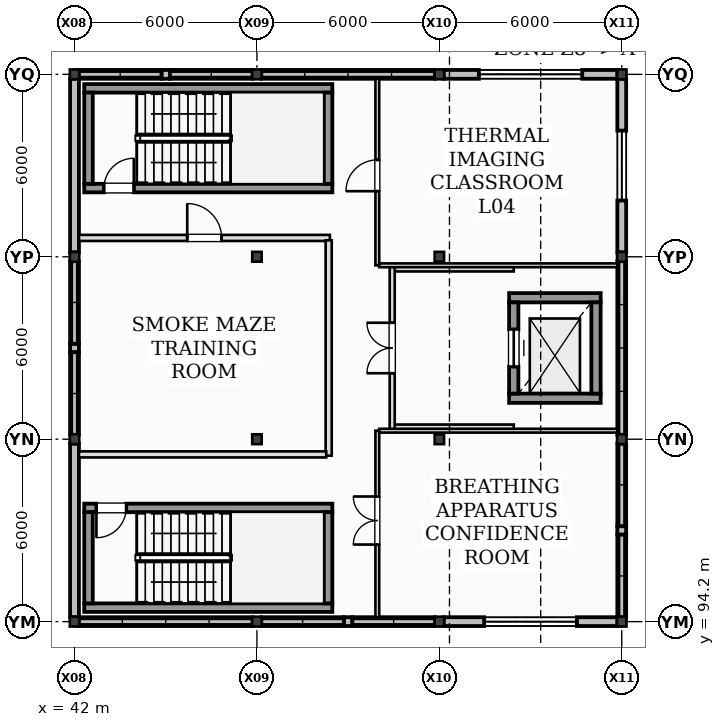
"""IFC4 building model, lengths in metres.
Left out: names, types, materials, properties, quantities, classifications, styles, units other than length and angle.
Written with IfcOpenShell. Run it as: python <this file> out.ifc"""

import sys

from ifc_helpers import new_model, si_unit, direction, frame, frame_2d, origin, origin_2d, place, context, subcontext, project, spatial, rectangle, i_section, extrude, element, fill, save


model = new_model("IFC4")
c1 = context("Model", 3, precision=1e-05, world=origin(), true_north=direction((0.0, 1.0)))
c2 = subcontext(c1, "Body", "Model", "MODEL_VIEW")
j1 = project(units=[si_unit("LENGTHUNIT", "METRE"), si_unit("PLANEANGLEUNIT", "RADIAN")], contexts=[c1])
p1 = place(None, origin())
s1 = spatial("IfcSite", under=j1, at=p1, CompositionType="ELEMENT")
p2 = place(p1, origin())
s2 = spatial("IfcBuilding", under=s1, at=p2, CompositionType="ELEMENT")
p3 = place(p2, frame((0.0, 0.0, 14.0)))
s3 = spatial("IfcBuildingStorey", under=s2, at=p3, CompositionType="ELEMENT", Elevation=14.0)
for number, where, z_axis, x_axis in (
    (1, (42.0, 94.2, 0.0), (0.0, 0.0, 1.0), (1.0, 0.0, 0.0)),
    (2, (42.0, 100.2, 0.0), (0.0, 0.0, 1.0), (1.0, 0.0, 0.0)),
    (3, (42.0, 106.2, 0.0), (0.0, 0.0, 1.0), (1.0, 0.0, 0.0)),
    (4, (42.0, 112.2, 0.0), (0.0, 0.0, 1.0), (1.0, 0.0, 0.0)),
    (5, (48.0, 94.2, 0.0), (0.0, 0.0, 1.0), (1.0, 0.0, 0.0)),
    (6, (48.0, 100.2, 0.0), (0.0, 0.0, 1.0), (1.0, 0.0, 0.0)),
    (7, (48.0, 106.2, 0.0), (0.0, 0.0, 1.0), (1.0, 0.0, 0.0)),
    (8, (48.0, 112.2, 0.0), (0.0, 0.0, 1.0), (1.0, 0.0, 0.0)),
    (9, (54.0, 94.2, 0.0), (0.0, 0.0, 1.0), (1.0, 0.0, 0.0)),
    (10, (54.0, 100.2, 0.0), (0.0, 0.0, 1.0), (1.0, 0.0, 0.0)),
    (11, (54.0, 106.2, 0.0), (0.0, 0.0, 1.0), (1.0, 0.0, 0.0)),
    (12, (54.0, 112.2, 0.0), (0.0, 0.0, 1.0), (1.0, 0.0, 0.0)),
    (13, (60.0, 94.2, 0.0), (0.0, 0.0, 1.0), (1.0, 0.0, 0.0)),
    (14, (60.0, 100.2, 0.0), (0.0, 0.0, 1.0), (1.0, 0.0, 0.0)),
    (15, (60.0, 106.2, 0.0), (0.0, 0.0, 1.0), (1.0, 0.0, 0.0)),
    (16, (60.0, 112.2, 0.0), (0.0, 0.0, 1.0), (1.0, 0.0, 0.0)),
):
    element("IfcColumn", number, at=place(p3, frame(where, z_axis=z_axis, x_axis=x_axis)), inside=s3, PredefinedType="COLUMN", context=c2, shape_type="SweptSolid", body=[
        extrude(i_section(OverallWidth=0.309, OverallDepth=0.323, WebThickness=0.013, FlangeThickness=0.023, at=origin_2d()), origin(), (0.0, 0.0, 1.0), 4.0),
    ])
p4 = place(p3, frame((42.145, 94.2, 0.0), z_axis=(0.0, 0.0, 1.0), x_axis=(1.0, 0.0, 0.0)))
e17 = element("IfcWall", 17, at=p4, inside=s3, PredefinedType="STANDARD", context=c2, shape_type="SweptSolid", body=[
    extrude(rectangle(XDim=5.71, YDim=0.29, at=frame_2d((2.855, 0.0))), origin(), (0.0, 0.0, 1.0), 0.56),
])
p5 = place(p3, frame((50.86, 94.2, 0.0), z_axis=(0.0, 0.0, 1.0), x_axis=(1.0, 0.0, 0.0)))
e18 = element("IfcWall", 18, at=p5, inside=s3, PredefinedType="STANDARD", context=c2, shape_type="SweptSolid", body=[
    extrude(rectangle(XDim=0.28, YDim=0.29, at=frame_2d((0.14, 0.0))), origin(), (0.0, 0.0, 1.0), 3.269),
])
p6 = place(p3, frame((48.145, 94.2, 0.0), z_axis=(0.0, 0.0, 1.0), x_axis=(1.0, 0.0, 0.0)))
e19 = element("IfcWall", 19, at=p6, inside=s3, PredefinedType="STANDARD", context=c2, shape_type="SweptSolid", body=[
    extrude(rectangle(XDim=2.715, YDim=0.29, at=frame_2d((1.357, 0.0))), origin(), (0.0, 0.0, 1.0), 0.68),
])
p7 = place(p3, frame((51.14, 94.2, 0.0), z_axis=(0.0, 0.0, 1.0), x_axis=(1.0, 0.0, 0.0)))
e20 = element("IfcWall", 20, at=p7, inside=s3, PredefinedType="STANDARD", context=c2, shape_type="SweptSolid", body=[
    extrude(rectangle(XDim=2.715, YDim=0.29, at=frame_2d((1.357, 0.0))), origin(), (0.0, 0.0, 1.0), 0.8),
])
p8 = place(p3, frame((54.145, 94.2, 0.0), z_axis=(0.0, 0.0, 1.0), x_axis=(1.0, 0.0, 0.0)))
e21 = element("IfcWall", 21, at=p8, inside=s3, PredefinedType="STANDARD", context=c2, shape_type="SweptSolid", body=[
    extrude(rectangle(XDim=5.71, YDim=0.29, at=frame_2d((2.855, 0.0))), origin(), (0.0, 0.0, 1.0), 3.269),
])
p9 = place(p8, frame((1.33, 0.0, 0.85)))
e22 = element("IfcOpeningElement", 22, at=p9, cuts=e21, PredefinedType="OPENING", context=c2, shape_type="SweptSolid", body=[
    extrude(rectangle(XDim=3.05, YDim=1.75, at=frame_2d((1.525, 0.875))), frame((0.0, 0.155, 0.0), z_axis=(0.0, -1.0, 0.0), x_axis=(1.0, 0.0, 0.0)), (0.0, 0.0, 1.0), 0.31),
])
p10 = place(p3, frame((45.14, 112.2, 0.0), z_axis=(0.0, 0.0, 1.0), x_axis=(-1.0, 0.0, 0.0)))
e23 = element("IfcWall", 23, at=p10, inside=s3, PredefinedType="STANDARD", context=c2, shape_type="SweptSolid", body=[
    extrude(rectangle(XDim=0.28, YDim=0.29, at=frame_2d((0.14, 0.0))), origin(), (0.0, 0.0, 1.0), 3.269),
])
p11 = place(p3, frame((47.855, 112.2, 0.0), z_axis=(0.0, 0.0, 1.0), x_axis=(-1.0, 0.0, 0.0)))
e24 = element("IfcWall", 24, at=p11, inside=s3, PredefinedType="STANDARD", context=c2, shape_type="SweptSolid", body=[
    extrude(rectangle(XDim=2.715, YDim=0.29, at=frame_2d((1.357, 0.0))), origin(), (0.0, 0.0, 1.0), 0.92),
])
p12 = place(p3, frame((44.86, 112.2, 0.0), z_axis=(0.0, 0.0, 1.0), x_axis=(-1.0, 0.0, 0.0)))
e25 = element("IfcWall", 25, at=p12, inside=s3, PredefinedType="STANDARD", context=c2, shape_type="SweptSolid", body=[
    extrude(rectangle(XDim=2.715, YDim=0.29, at=frame_2d((1.357, 0.0))), origin(), (0.0, 0.0, 1.0), 0.32),
])
p13 = place(p3, frame((53.855, 112.2, 0.0), z_axis=(0.0, 0.0, 1.0), x_axis=(-1.0, 0.0, 0.0)))
e26 = element("IfcWall", 26, at=p13, inside=s3, PredefinedType="STANDARD", context=c2, shape_type="SweptSolid", body=[
    extrude(rectangle(XDim=5.71, YDim=0.29, at=frame_2d((2.855, 0.0))), origin(), (0.0, 0.0, 1.0), 0.44),
])
p14 = place(p3, frame((59.855, 112.2, 0.0), z_axis=(0.0, 0.0, 1.0), x_axis=(-1.0, 0.0, 0.0)))
e27 = element("IfcWall", 27, at=p14, inside=s3, PredefinedType="STANDARD", context=c2, shape_type="SweptSolid", body=[
    extrude(rectangle(XDim=5.71, YDim=0.29, at=frame_2d((2.855, 0.0))), origin(), (0.0, 0.0, 1.0), 3.269),
])
p15 = place(p14, frame((1.155, 0.0, 0.85)))
e28 = element("IfcOpeningElement", 28, at=p15, cuts=e27, PredefinedType="OPENING", context=c2, shape_type="SweptSolid", body=[
    extrude(rectangle(XDim=3.4, YDim=1.75, at=frame_2d((1.7, 0.875))), frame((0.0, 0.155, 0.0), z_axis=(0.0, -1.0, 0.0), x_axis=(1.0, 0.0, 0.0)), (0.0, 0.0, 1.0), 0.31),
])
p16 = place(p3, frame((42.0, 100.055, 0.0), z_axis=(0.0, 0.0, 1.0), x_axis=(0.0, -1.0, 0.0)))
e29 = element("IfcWall", 29, at=p16, inside=s3, PredefinedType="STANDARD", context=c2, shape_type="SweptSolid", body=[
    extrude(rectangle(XDim=5.71, YDim=0.29, at=frame_2d((2.855, 0.0))), origin(), (0.0, 0.0, 1.0), 3.273),
])
p17 = place(p3, frame((42.0, 103.34, 0.0), z_axis=(0.0, 0.0, 1.0), x_axis=(0.0, -1.0, 0.0)))
e30 = element("IfcWall", 30, at=p17, inside=s3, PredefinedType="STANDARD", context=c2, shape_type="SweptSolid", body=[
    extrude(rectangle(XDim=0.28, YDim=0.29, at=frame_2d((0.14, 0.0))), origin(), (0.0, 0.0, 1.0), 3.273),
])
p18 = place(p3, frame((42.0, 106.055, 0.0), z_axis=(0.0, 0.0, 1.0), x_axis=(0.0, -1.0, 0.0)))
e31 = element("IfcWall", 31, at=p18, inside=s3, PredefinedType="STANDARD", context=c2, shape_type="SweptSolid", body=[
    extrude(rectangle(XDim=2.715, YDim=0.29, at=frame_2d((1.357, 0.0))), origin(), (0.0, 0.0, 1.0), 0.56),
])
p19 = place(p3, frame((42.0, 103.06, 0.0), z_axis=(0.0, 0.0, 1.0), x_axis=(0.0, -1.0, 0.0)))
e32 = element("IfcWall", 32, at=p19, inside=s3, PredefinedType="STANDARD", context=c2, shape_type="SweptSolid", body=[
    extrude(rectangle(XDim=2.715, YDim=0.29, at=frame_2d((1.357, 0.0))), origin(), (0.0, 0.0, 1.0), 0.68),
])
p20 = place(p3, frame((42.0, 112.055, 0.0), z_axis=(0.0, 0.0, 1.0), x_axis=(0.0, -1.0, 0.0)))
e33 = element("IfcWall", 33, at=p20, inside=s3, PredefinedType="STANDARD", context=c2, shape_type="SweptSolid", body=[
    extrude(rectangle(XDim=5.71, YDim=0.29, at=frame_2d((2.855, 0.0))), origin(), (0.0, 0.0, 1.0), 3.273),
])
p21 = place(p3, frame((60.0, 97.06, 0.0), z_axis=(0.0, 0.0, 1.0), x_axis=(0.0, 1.0, 0.0)))
e34 = element("IfcWall", 34, at=p21, inside=s3, PredefinedType="STANDARD", context=c2, shape_type="SweptSolid", body=[
    extrude(rectangle(XDim=0.28, YDim=0.29, at=frame_2d((0.14, 0.0))), origin(), (0.0, 0.0, 1.0), 3.273),
])
p22 = place(p3, frame((60.0, 94.345, 0.0), z_axis=(0.0, 0.0, 1.0), x_axis=(0.0, 1.0, 0.0)))
e35 = element("IfcWall", 35, at=p22, inside=s3, PredefinedType="STANDARD", context=c2, shape_type="SweptSolid", body=[
    extrude(rectangle(XDim=2.715, YDim=0.29, at=frame_2d((1.357, 0.0))), origin(), (0.0, 0.0, 1.0), 0.8),
])
p23 = place(p3, frame((60.0, 97.34, 0.0), z_axis=(0.0, 0.0, 1.0), x_axis=(0.0, 1.0, 0.0)))
e36 = element("IfcWall", 36, at=p23, inside=s3, PredefinedType="STANDARD", context=c2, shape_type="SweptSolid", body=[
    extrude(rectangle(XDim=2.715, YDim=0.29, at=frame_2d((1.357, 0.0))), origin(), (0.0, 0.0, 1.0), 0.92),
])
p24 = place(p3, frame((60.0, 100.345, 0.0), z_axis=(0.0, 0.0, 1.0), x_axis=(0.0, 1.0, 0.0)))
e37 = element("IfcWall", 37, at=p24, inside=s3, PredefinedType="STANDARD", context=c2, shape_type="SweptSolid", body=[
    extrude(rectangle(XDim=5.71, YDim=0.29, at=frame_2d((2.855, 0.0))), origin(), (0.0, 0.0, 1.0), 0.32),
])
p25 = place(p3, frame((60.0, 106.345, 0.0), z_axis=(0.0, 0.0, 1.0), x_axis=(0.0, 1.0, 0.0)))
e38 = element("IfcWall", 38, at=p25, inside=s3, PredefinedType="STANDARD", context=c2, shape_type="SweptSolid", body=[
    extrude(rectangle(XDim=5.71, YDim=0.29, at=frame_2d((2.855, 0.0))), origin(), (0.0, 0.0, 1.0), 3.273),
])
p26 = place(p25, frame((1.705, 0.0, 1.0)))
e39 = element("IfcOpeningElement", 39, at=p26, cuts=e38, PredefinedType="OPENING", context=c2, shape_type="SweptSolid", body=[
    extrude(rectangle(XDim=2.3, YDim=0.88, at=frame_2d((1.15, 0.44))), frame((0.0, 0.155, 0.0), z_axis=(0.0, -1.0, 0.0), x_axis=(1.0, 0.0, 0.0)), (0.0, 0.0, 1.0), 0.31),
])
p27 = place(p3, frame((42.32, 94.66, 0.0), z_axis=(0.0, 0.0, 1.0), x_axis=(1.0, 0.0, 0.0)))
e40 = element("IfcWall", 40, at=p27, inside=s3, PredefinedType="SHEAR", context=c2, shape_type="SweptSolid", body=[
    extrude(rectangle(XDim=8.16, YDim=0.28, at=frame_2d((4.08, 0.0))), origin(), (0.0, 0.0, 1.0), 4.0),
])
p28 = place(p3, frame((50.48, 97.94, 0.0), z_axis=(0.0, 0.0, 1.0), x_axis=(-1.0, 0.0, 0.0)))
e41 = element("IfcWall", 41, at=p28, inside=s3, PredefinedType="SHEAR", context=c2, shape_type="SweptSolid", body=[
    extrude(rectangle(XDim=8.16, YDim=0.28, at=frame_2d((4.08, 0.0))), origin(), (0.0, 0.0, 1.0), 4.0),
])
p29 = place(p28, frame((6.78, 0.0, 0.0)))
e42 = element("IfcOpeningElement", 42, at=p29, cuts=e41, PredefinedType="OPENING", context=c2, shape_type="SweptSolid", body=[
    extrude(rectangle(XDim=0.98, YDim=2.15, at=frame_2d((0.49, 1.075))), frame((0.0, 0.15, 0.0), z_axis=(0.0, -1.0, 0.0), x_axis=(1.0, 0.0, 0.0)), (0.0, 0.0, 1.0), 0.3),
])
for number, where, z_axis, x_axis in (
    (43, (42.46, 97.8, 0.0), (0.0, 0.0, 1.0), (0.0, -1.0, 0.0)),
    (44, (50.34, 94.8, 0.0), (0.0, 0.0, 1.0), (0.0, 1.0, 0.0)),
):
    element("IfcWall", number, at=place(p3, frame(where, z_axis=z_axis, x_axis=x_axis)), inside=s3, PredefinedType="SHEAR", context=c2, shape_type="SweptSolid", body=[
        extrude(rectangle(XDim=3.0, YDim=0.28, at=frame_2d((1.5, 0.0))), origin(), (0.0, 0.0, 1.0), 4.0),
    ])
p30 = place(p3, frame((42.32, 108.46, 0.0), z_axis=(0.0, 0.0, 1.0), x_axis=(1.0, 0.0, 0.0)))
e45 = element("IfcWall", 45, at=p30, inside=s3, PredefinedType="SHEAR", context=c2, shape_type="SweptSolid", body=[
    extrude(rectangle(XDim=8.16, YDim=0.28, at=frame_2d((4.08, 0.0))), origin(), (0.0, 0.0, 1.0), 4.0),
])
p31 = place(p30, frame((0.65, 0.0, 0.0)))
e46 = element("IfcOpeningElement", 46, at=p31, cuts=e45, PredefinedType="OPENING", context=c2, shape_type="SweptSolid", body=[
    extrude(rectangle(XDim=0.98, YDim=2.15, at=frame_2d((0.49, 1.075))), frame((0.0, 0.15, 0.0), z_axis=(0.0, -1.0, 0.0), x_axis=(1.0, 0.0, 0.0)), (0.0, 0.0, 1.0), 0.3),
])
p32 = place(p3, frame((50.48, 111.74, 0.0), z_axis=(0.0, 0.0, 1.0), x_axis=(-1.0, 0.0, 0.0)))
e47 = element("IfcWall", 47, at=p32, inside=s3, PredefinedType="SHEAR", context=c2, shape_type="SweptSolid", body=[
    extrude(rectangle(XDim=8.16, YDim=0.28, at=frame_2d((4.08, 0.0))), origin(), (0.0, 0.0, 1.0), 4.0),
])
for number, where, z_axis, x_axis in (
    (48, (42.46, 111.6, 0.0), (0.0, 0.0, 1.0), (0.0, -1.0, 0.0)),
    (49, (50.34, 108.6, 0.0), (0.0, 0.0, 1.0), (0.0, 1.0, 0.0)),
):
    element("IfcWall", number, at=place(p3, frame(where, z_axis=z_axis, x_axis=x_axis)), inside=s3, PredefinedType="SHEAR", context=c2, shape_type="SweptSolid", body=[
        extrude(rectangle(XDim=3.0, YDim=0.28, at=frame_2d((1.5, 0.0))), origin(), (0.0, 0.0, 1.0), 4.0),
    ])
for number, where, z_axis, x_axis in (
    (50, (56.295, 101.548, 0.0), (0.0, 0.0, 1.0), (1.0, 0.0, 0.0)),
    (51, (59.305, 104.853, 0.0), (0.0, 0.0, 1.0), (-1.0, 0.0, 0.0)),
):
    element("IfcWall", number, at=place(p3, frame(where, z_axis=z_axis, x_axis=x_axis)), inside=s3, PredefinedType="SHEAR", context=c2, shape_type="SweptSolid", body=[
        extrude(rectangle(XDim=3.01, YDim=0.305, at=frame_2d((1.505, 0.0))), origin(), (0.0, 0.0, 1.0), 4.0),
    ])
p33 = place(p3, frame((56.448, 104.7, 0.0), z_axis=(0.0, 0.0, 1.0), x_axis=(0.0, -1.0, 0.0)))
e52 = element("IfcWall", 52, at=p33, inside=s3, PredefinedType="SHEAR", context=c2, shape_type="SweptSolid", body=[
    extrude(rectangle(XDim=3.0, YDim=0.305, at=frame_2d((1.5, 0.0))), origin(), (0.0, 0.0, 1.0), 4.0),
])
p34 = place(p33, frame((0.89, 0.0, 0.0)))
e53 = element("IfcOpeningElement", 53, at=p34, cuts=e52, PredefinedType="OPENING", context=c2, shape_type="SweptSolid", body=[
    extrude(rectangle(XDim=1.22, YDim=2.22, at=frame_2d((0.61, 1.11))), frame((0.0, 0.162, 0.0), z_axis=(0.0, -1.0, 0.0), x_axis=(1.0, 0.0, 0.0)), (0.0, 0.0, 1.0), 0.325),
])
p35 = place(p3, frame((59.153, 101.7, 0.0), z_axis=(0.0, 0.0, 1.0), x_axis=(0.0, 1.0, 0.0)))
e54 = element("IfcWall", 54, at=p35, inside=s3, PredefinedType="SHEAR", context=c2, shape_type="SweptSolid", body=[
    extrude(rectangle(XDim=3.0, YDim=0.305, at=frame_2d((1.5, 0.0))), origin(), (0.0, 0.0, 1.0), 4.0),
])
for number, where, z_axis, x_axis in (
    (55, (52.45, 100.6, 0.0), (0.0, 0.0, 1.0), (1.0, 0.0, 0.0)),
    (56, (56.448, 105.8, 0.0), (0.0, 0.0, 1.0), (-1.0, 0.0, 0.0)),
):
    element("IfcWall", number, at=place(p3, frame(where, z_axis=z_axis, x_axis=x_axis)), inside=s3, PredefinedType="PARTITIONING", context=c2, shape_type="SweptSolid", body=[
        extrude(rectangle(XDim=3.998, YDim=0.165, at=frame_2d((1.999, 0.0))), origin(), (0.0, 0.0, 1.0), 3.76),
    ])
p36 = place(p3, frame((52.45, 100.52, 0.0), z_axis=(0.0, 0.0, 1.0), x_axis=(0.0, 1.0, 0.0)))
e57 = element("IfcWall", 57, at=p36, inside=s3, PredefinedType="PARTITIONING", context=c2, shape_type="SweptSolid", body=[
    extrude(rectangle(XDim=5.36, YDim=0.165, at=frame_2d((2.68, 0.0))), origin(), (0.0, 0.0, 1.0), 3.76),
])
p37 = place(p36, frame((1.85, 0.0, 0.0)))
e58 = element("IfcOpeningElement", 58, at=p37, cuts=e57, PredefinedType="OPENING", context=c2, shape_type="SweptSolid", body=[
    extrude(rectangle(XDim=1.66, YDim=2.2, at=frame_2d((0.83, 1.1))), frame((0.0, 0.093, 0.0), z_axis=(0.0, -1.0, 0.0), x_axis=(1.0, 0.0, 0.0)), (0.0, 0.0, 1.0), 0.185),
])
p38 = place(p3, frame((42.145, 106.82, 0.0), z_axis=(0.0, 0.0, 1.0), x_axis=(1.0, 0.0, 0.0)))
e59 = element("IfcWall", 59, at=p38, inside=s3, PredefinedType="PARTITIONING", context=c2, shape_type="SweptSolid", body=[
    extrude(rectangle(XDim=8.255, YDim=0.2, at=frame_2d((4.127, 0.0))), origin(), (0.0, 0.0, 1.0), 3.76),
])
p39 = place(p38, frame((3.562, 0.0, 0.0)))
e60 = element("IfcOpeningElement", 60, at=p39, cuts=e59, PredefinedType="OPENING", context=c2, shape_type="SweptSolid", body=[
    extrude(rectangle(XDim=1.13, YDim=2.18, at=frame_2d((0.565, 1.09))), frame((0.0, 0.11, 0.0), z_axis=(0.0, -1.0, 0.0), x_axis=(1.0, 0.0, 0.0)), (0.0, 0.0, 1.0), 0.22),
])
p40 = place(p3, frame((50.36, 106.74, 0.0), z_axis=(0.0, 0.0, 1.0), x_axis=(0.0, -1.0, 0.0)))
e61 = element("IfcWall", 61, at=p40, inside=s3, PredefinedType="PARTITIONING", context=c2, shape_type="SweptSolid", body=[
    extrude(rectangle(XDim=7.08, YDim=0.2, at=frame_2d((3.54, 0.0))), origin(), (0.0, 0.0, 1.0), 3.76),
])
p41 = place(p3, frame((50.28, 99.7, 0.0), z_axis=(0.0, 0.0, 1.0), x_axis=(-1.0, 0.0, 0.0)))
e62 = element("IfcWall", 62, at=p41, inside=s3, PredefinedType="PARTITIONING", context=c2, shape_type="SweptSolid", body=[
    extrude(rectangle(XDim=8.135, YDim=0.2, at=frame_2d((4.067, 0.0))), origin(), (0.0, 0.0, 1.0), 3.76),
])
p42 = place(p3, frame((51.96, 94.345, 0.0), z_axis=(0.0, 0.0, 1.0), x_axis=(0.0, 1.0, 0.0)))
e63 = element("IfcWall", 63, at=p42, inside=s3, PredefinedType="PARTITIONING", context=c2, shape_type="SweptSolid", body=[
    extrude(rectangle(XDim=6.137, YDim=0.125, at=frame_2d((3.069, 0.0))), origin(), (0.0, 0.0, 1.0), 3.374),
])
p43 = place(p42, frame((2.39, 0.0, 0.0)))
e64 = element("IfcOpeningElement", 64, at=p43, cuts=e63, PredefinedType="OPENING", context=c2, shape_type="SweptSolid", body=[
    extrude(rectangle(XDim=1.58, YDim=2.2, at=frame_2d((0.79, 1.1))), frame((0.0, 0.073, 0.0), z_axis=(0.0, -1.0, 0.0), x_axis=(1.0, 0.0, 0.0)), (0.0, 0.0, 1.0), 0.145),
])
p44 = place(p3, frame((52.022, 100.48, 0.0), z_axis=(0.0, 0.0, 1.0), x_axis=(1.0, 0.0, 0.0)))
e65 = element("IfcWall", 65, at=p44, inside=s3, PredefinedType="PARTITIONING", context=c2, shape_type="SweptSolid", body=[
    extrude(rectangle(XDim=7.833, YDim=0.125, at=frame_2d((3.916, 0.0))), origin(), (0.0, 0.0, 1.0), 3.269),
])
p45 = place(p3, frame((51.96, 105.917, 0.0), z_axis=(0.0, 0.0, 1.0), x_axis=(0.0, 1.0, 0.0)))
e66 = element("IfcWall", 66, at=p45, inside=s3, PredefinedType="PARTITIONING", context=c2, shape_type="SweptSolid", body=[
    extrude(rectangle(XDim=6.137, YDim=0.125, at=frame_2d((3.069, 0.0))), origin(), (0.0, 0.0, 1.0), 3.374),
])
p46 = place(p45, frame((2.44, 0.0, 0.0)))
e67 = element("IfcOpeningElement", 67, at=p46, cuts=e66, PredefinedType="OPENING", context=c2, shape_type="SweptSolid", body=[
    extrude(rectangle(XDim=1.03, YDim=2.15, at=frame_2d((0.515, 1.075))), frame((0.0, 0.073, 0.0), z_axis=(0.0, -1.0, 0.0), x_axis=(1.0, 0.0, 0.0)), (0.0, 0.0, 1.0), 0.145),
])
p47 = place(p3, frame((59.855, 105.92, 0.0), z_axis=(0.0, 0.0, 1.0), x_axis=(-1.0, 0.0, 0.0)))
e68 = element("IfcWall", 68, at=p47, inside=s3, PredefinedType="PARTITIONING", context=c2, shape_type="SweptSolid", body=[
    extrude(rectangle(XDim=7.833, YDim=0.125, at=frame_2d((3.916, 0.0))), origin(), (0.0, 0.0, 1.0), 3.269),
])
p48 = place(p9, origin())
e69 = element("IfcWindow", 69, at=p48, inside=s3, PartitioningType="SINGLE_PANEL", PredefinedType="WINDOW", context=c2, shape_type="SweptSolid", body=[
    extrude(rectangle(XDim=3.05, YDim=1.75, at=frame_2d((1.525, 0.875))), frame((0.0, 0.03, 0.0), z_axis=(0.0, -1.0, 0.0), x_axis=(1.0, 0.0, 0.0)), (0.0, 0.0, 1.0), 0.06),
])
fill(e22, e69)
p49 = place(p15, origin())
e70 = element("IfcWindow", 70, at=p49, inside=s3, PartitioningType="SINGLE_PANEL", PredefinedType="WINDOW", context=c2, shape_type="SweptSolid", body=[
    extrude(rectangle(XDim=3.4, YDim=1.75, at=frame_2d((1.7, 0.875))), frame((0.0, 0.03, 0.0), z_axis=(0.0, -1.0, 0.0), x_axis=(1.0, 0.0, 0.0)), (0.0, 0.0, 1.0), 0.06),
])
fill(e28, e70)
p50 = place(p26, origin())
e71 = element("IfcWindow", 71, at=p50, inside=s3, PartitioningType="SINGLE_PANEL", PredefinedType="WINDOW", context=c2, shape_type="SweptSolid", body=[
    extrude(rectangle(XDim=2.3, YDim=0.88, at=frame_2d((1.15, 0.44))), frame((0.0, 0.03, 0.0), z_axis=(0.0, -1.0, 0.0), x_axis=(1.0, 0.0, 0.0)), (0.0, 0.0, 1.0), 0.06),
])
fill(e39, e71)
p51 = place(p29, origin())
e72 = element("IfcDoor", 72, at=p51, inside=s3, OperationType="SINGLE_SWING_RIGHT", PredefinedType="DOOR", context=c2, shape_type="SweptSolid", body=[
    extrude(rectangle(XDim=0.98, YDim=2.15, at=frame_2d((0.49, 1.075))), frame((0.0, 0.025, 0.0), z_axis=(0.0, -1.0, 0.0), x_axis=(1.0, 0.0, 0.0)), (0.0, 0.0, 1.0), 0.05),
])
fill(e42, e72)
p52 = place(p31, origin())
e73 = element("IfcDoor", 73, at=p52, inside=s3, OperationType="SINGLE_SWING_RIGHT", PredefinedType="DOOR", context=c2, shape_type="SweptSolid", body=[
    extrude(rectangle(XDim=0.98, YDim=2.15, at=frame_2d((0.49, 1.075))), frame((0.0, 0.025, 0.0), z_axis=(0.0, -1.0, 0.0), x_axis=(1.0, 0.0, 0.0)), (0.0, 0.0, 1.0), 0.05),
])
fill(e46, e73)
p53 = place(p34, origin())
e74 = element("IfcDoor", 74, at=p53, inside=s3, OperationType="SLIDING_TO_LEFT", PredefinedType="DOOR", context=c2, shape_type="SweptSolid", body=[
    extrude(rectangle(XDim=1.22, YDim=2.22, at=frame_2d((0.61, 1.11))), frame((0.0, 0.025, 0.0), z_axis=(0.0, -1.0, 0.0), x_axis=(1.0, 0.0, 0.0)), (0.0, 0.0, 1.0), 0.05),
])
fill(e53, e74)
p54 = place(p37, frame((1.66, 0.0, 0.0), z_axis=(0.0, 0.0, 1.0), x_axis=(-1.0, 0.0, 0.0)))
e75 = element("IfcDoor", 75, at=p54, inside=s3, OperationType="DOUBLE_DOOR_SINGLE_SWING", PredefinedType="DOOR", context=c2, shape_type="SweptSolid", body=[
    extrude(rectangle(XDim=1.66, YDim=2.2, at=frame_2d((0.83, 1.1))), frame((0.0, 0.025, 0.0), z_axis=(0.0, -1.0, 0.0), x_axis=(1.0, 0.0, 0.0)), (0.0, 0.0, 1.0), 0.05),
])
fill(e58, e75)
p55 = place(p39, frame((1.13, 0.0, 0.0), z_axis=(0.0, 0.0, 1.0), x_axis=(-1.0, 0.0, 0.0)))
e76 = element("IfcDoor", 76, at=p55, inside=s3, OperationType="SINGLE_SWING_LEFT", PredefinedType="DOOR", context=c2, shape_type="SweptSolid", body=[
    extrude(rectangle(XDim=1.13, YDim=2.18, at=frame_2d((0.565, 1.09))), frame((0.0, 0.025, 0.0), z_axis=(0.0, -1.0, 0.0), x_axis=(1.0, 0.0, 0.0)), (0.0, 0.0, 1.0), 0.05),
])
fill(e60, e76)
p56 = place(p43, frame((1.58, 0.0, 0.0), z_axis=(0.0, 0.0, 1.0), x_axis=(-1.0, 0.0, 0.0)))
e77 = element("IfcDoor", 77, at=p56, inside=s3, OperationType="DOUBLE_DOOR_SINGLE_SWING", PredefinedType="DOOR", context=c2, shape_type="SweptSolid", body=[
    extrude(rectangle(XDim=1.58, YDim=2.2, at=frame_2d((0.79, 1.1))), frame((0.0, 0.025, 0.0), z_axis=(0.0, -1.0, 0.0), x_axis=(1.0, 0.0, 0.0)), (0.0, 0.0, 1.0), 0.05),
])
fill(e64, e77)
p57 = place(p46, frame((1.03, 0.0, 0.0), z_axis=(0.0, 0.0, 1.0), x_axis=(-1.0, 0.0, 0.0)))
e78 = element("IfcDoor", 78, at=p57, inside=s3, OperationType="SINGLE_SWING_LEFT", PredefinedType="DOOR", context=c2, shape_type="SweptSolid", body=[
    extrude(rectangle(XDim=1.03, YDim=2.15, at=frame_2d((0.515, 1.075))), frame((0.0, 0.025, 0.0), z_axis=(0.0, -1.0, 0.0), x_axis=(1.0, 0.0, 0.0)), (0.0, 0.0, 1.0), 0.05),
])
fill(e67, e78)
save(model, sys.argv[1])
